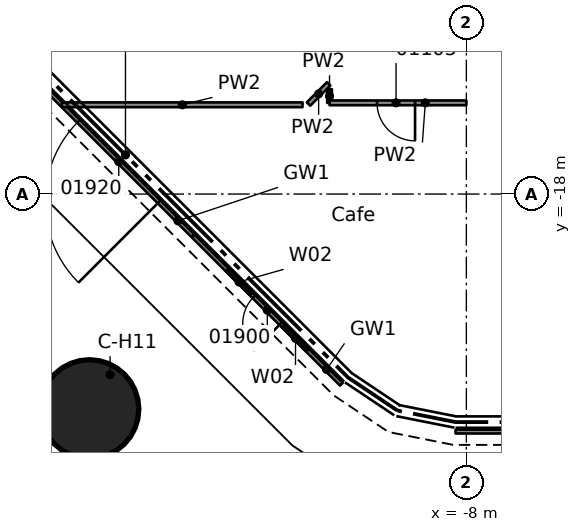
"""IFC4 building model, lengths in metres.
Left out: names, types, materials, properties, quantities, classifications, styles, units other than length and angle.
Written with IfcOpenShell. Run it as: python <this file> out.ifc"""

import sys

from ifc_helpers import new_model, si_unit, direction, frame, frame_2d, origin, origin_2d, place, context, subcontext, project, spatial, rectangle, circle, extrude, element, fill, save


model = new_model("IFC4")
c1 = context("Model", 3, precision=1e-05, world=origin(), true_north=direction((0.0, 1.0)))
c2 = subcontext(c1, "Body", "Model", "MODEL_VIEW")
j1 = project(units=[si_unit("LENGTHUNIT", "METRE"), si_unit("PLANEANGLEUNIT", "RADIAN")], contexts=[c1])
p1 = place(None, origin())
s1 = spatial("IfcSite", under=j1, at=p1, CompositionType="ELEMENT")
p2 = place(p1, origin())
s2 = spatial("IfcBuilding", under=s1, at=p2, CompositionType="ELEMENT")
p3 = place(p2, origin())
s3 = spatial("IfcBuildingStorey", under=s2, at=p3, CompositionType="ELEMENT", Elevation=0.0)
p4 = place(p3, frame((-17.919, -23.659, 0.6), z_axis=(0.0, 0.0, 1.0), x_axis=(1.0, 0.0, 0.0)))
e1 = element("IfcColumn", 1, at=p4, inside=s3, PredefinedType="COLUMN", context=c2, shape_type="SweptSolid", body=[
    extrude(circle(Radius=1.3, at=origin_2d()), origin(), (0.0, 0.0, 1.0), 8.9),
])
p5 = place(p3, frame((-11.289, -23.005, -0.4), z_axis=(0.0, 0.0, 1.0), x_axis=(-0.707106781187, 0.707106781187, 0.0)))
e2 = element("IfcWall", 2, at=p5, inside=s3, PredefinedType="STANDARD", context=c2, shape_type="SweptSolid", body=[
    extrude(rectangle(XDim=5.514, YDim=0.1, at=frame_2d((2.757, 0.0))), origin(), (0.0, 0.0, 1.0), 10.5),
])
p6 = place(p5, frame((2.257, 0.0, 0.4)))
e3 = element("IfcOpeningElement", 3, at=p6, cuts=e2, PredefinedType="OPENING", context=c2, shape_type="SweptSolid", body=[
    extrude(rectangle(XDim=1.0, YDim=2.4, at=frame_2d((0.5, 1.2))), frame((0.0, 0.06, 0.0), z_axis=(0.0, -1.0, 0.0), x_axis=(1.0, 0.0, 0.0)), (0.0, 0.0, 1.0), 0.12),
])
p7 = place(p5, frame((1.257, 0.0, 0.4)))
e4 = element("IfcOpeningElement", 4, at=p7, cuts=e2, PredefinedType="OPENING", context=c2, shape_type="SweptSolid", body=[
    extrude(rectangle(XDim=0.9, YDim=2.4, at=frame_2d((0.45, 1.2))), frame((0.0, 0.06, 0.0), z_axis=(0.0, -1.0, 0.0), x_axis=(1.0, 0.0, 0.0)), (0.0, 0.0, 1.0), 0.12),
])
p8 = place(p5, frame((3.357, 0.0, 0.4)))
e5 = element("IfcOpeningElement", 5, at=p8, cuts=e2, PredefinedType="OPENING", context=c2, shape_type="SweptSolid", body=[
    extrude(rectangle(XDim=0.9, YDim=2.4, at=frame_2d((0.45, 1.2))), frame((0.0, 0.06, 0.0), z_axis=(0.0, -1.0, 0.0), x_axis=(1.0, 0.0, 0.0)), (0.0, 0.0, 1.0), 0.12),
])
p9 = place(p3, frame((-15.201, -19.093, -0.4), z_axis=(0.0, 0.0, 1.0), x_axis=(-0.707106781187, 0.707106781187, 0.0)))
e6 = element("IfcWall", 6, at=p9, inside=s3, PredefinedType="STANDARD", context=c2, shape_type="SweptSolid", body=[
    extrude(rectangle(XDim=5.504, YDim=0.1, at=frame_2d((2.752, 0.0))), origin(), (0.0, 0.0, 1.0), 10.5),
])
p10 = place(p9, frame((1.252, 0.0, 0.4)))
e7 = element("IfcOpeningElement", 7, at=p10, cuts=e6, PredefinedType="OPENING", context=c2, shape_type="SweptSolid", body=[
    extrude(rectangle(XDim=3.0, YDim=4.5, at=frame_2d((1.5, 2.25))), frame((0.0, 0.06, 0.0), z_axis=(0.0, -1.0, 0.0), x_axis=(1.0, 0.0, 0.0)), (0.0, 0.0, 1.0), 0.12),
])
p11 = place(p3, frame((-2.771, -24.25, -0.4), z_axis=(0.0, 0.0, 1.0), x_axis=(-1.0, 0.0, 0.0)))
e8 = element("IfcWall", 8, at=p11, inside=s3, PredefinedType="STANDARD", context=c2, shape_type="SweptSolid", body=[
    extrude(rectangle(XDim=5.513, YDim=0.1, at=frame_2d((2.757, 0.0))), origin(), (0.0, 0.0, 1.0), 10.5),
])
p12 = place(p11, frame((2.257, 0.0, 0.4)))
e9 = element("IfcOpeningElement", 9, at=p12, cuts=e8, PredefinedType="OPENING", context=c2, shape_type="SweptSolid", body=[
    extrude(rectangle(XDim=1.0, YDim=2.4, at=frame_2d((0.5, 1.2))), frame((0.0, 0.06, 0.0), z_axis=(0.0, -1.0, 0.0), x_axis=(1.0, 0.0, 0.0)), (0.0, 0.0, 1.0), 0.12),
])
p13 = place(p11, frame((1.257, 0.0, 0.4)))
e10 = element("IfcOpeningElement", 10, at=p13, cuts=e8, PredefinedType="OPENING", context=c2, shape_type="SweptSolid", body=[
    extrude(rectangle(XDim=0.9, YDim=2.4, at=frame_2d((0.45, 1.2))), frame((0.0, 0.06, 0.0), z_axis=(0.0, -1.0, 0.0), x_axis=(1.0, 0.0, 0.0)), (0.0, 0.0, 1.0), 0.12),
])
p14 = place(p11, frame((3.357, 0.0, 0.4)))
e11 = element("IfcOpeningElement", 11, at=p14, cuts=e8, PredefinedType="OPENING", context=c2, shape_type="SweptSolid", body=[
    extrude(rectangle(XDim=0.9, YDim=2.4, at=frame_2d((0.45, 1.2))), frame((0.0, 0.06, 0.0), z_axis=(0.0, -1.0, 0.0), x_axis=(1.0, 0.0, 0.0)), (0.0, 0.0, 1.0), 0.12),
])
p15 = place(p3, frame((-11.601, -15.242, 0.0), z_axis=(0.0, 0.0, 1.0), x_axis=(0.002726642898, -0.999996282702, 0.0)))
e12 = element("IfcWall", 12, at=p15, inside=s3, PredefinedType="PARTITIONING", context=c2, shape_type="SweptSolid", body=[
    extrude(rectangle(XDim=0.358, YDim=0.125, at=frame_2d((0.179, 0.0))), origin(), (0.0, 0.0, 1.0), 10.1),
])
p16 = place(p3, frame((-18.642, -15.651, 0.0), z_axis=(0.0, 0.0, 1.0), x_axis=(1.0, 0.0, 0.0)))
e13 = element("IfcWall", 13, at=p16, inside=s3, PredefinedType="PARTITIONING", context=c2, shape_type="SweptSolid", body=[
    extrude(rectangle(XDim=6.331, YDim=0.125, at=frame_2d((3.166, 0.0))), origin(), (0.0, 0.0, 1.0), 10.1),
])
p17 = place(p3, frame((-8.0, -15.6, 0.0), z_axis=(0.0, 0.0, 1.0), x_axis=(-1.0, 0.0, 0.0)))
e14 = element("IfcWall", 14, at=p17, inside=s3, PredefinedType="PARTITIONING", context=c2, shape_type="SweptSolid", body=[
    extrude(rectangle(XDim=3.6, YDim=0.125, at=frame_2d((1.8, 0.0))), origin(), (0.0, 0.0, 1.0), 10.1),
])
p18 = place(p17, frame((1.35, 0.0, 0.0)))
e15 = element("IfcOpeningElement", 15, at=p18, cuts=e14, PredefinedType="OPENING", context=c2, shape_type="SweptSolid", body=[
    extrude(rectangle(XDim=1.0, YDim=2.1, at=frame_2d((0.5, 1.05))), frame((0.0, 0.073, 0.0), z_axis=(0.0, -1.0, 0.0), x_axis=(1.0, 0.0, 0.0)), (0.0, 0.0, 1.0), 0.145),
])
p19 = place(p3, frame((-12.153, -15.631, 0.0), z_axis=(0.0, 0.0, 1.0), x_axis=(0.707106781187, 0.707106781187, 0.0)))
e16 = element("IfcWall", 16, at=p19, inside=s3, PredefinedType="PARTITIONING", context=c2, shape_type="SweptSolid", body=[
    extrude(rectangle(XDim=0.751, YDim=0.125, at=frame_2d((0.375, 0.0))), origin(), (0.0, 0.0, 1.0), 10.1),
])
p20 = place(p6, origin())
e17 = element("IfcDoor", 17, at=p20, inside=s3, OperationType="SINGLE_SWING_RIGHT", PredefinedType="DOOR", context=c2, shape_type="SweptSolid", body=[
    extrude(rectangle(XDim=1.0, YDim=2.4, at=frame_2d((0.5, 1.2))), frame((0.0, 0.025, 0.0), z_axis=(0.0, -1.0, 0.0), x_axis=(1.0, 0.0, 0.0)), (0.0, 0.0, 1.0), 0.05),
])
fill(e3, e17)
p21 = place(p7, origin())
e18 = element("IfcWindow", 18, at=p21, inside=s3, PartitioningType="SINGLE_PANEL", PredefinedType="WINDOW", context=c2, shape_type="SweptSolid", body=[
    extrude(rectangle(XDim=0.9, YDim=2.4, at=frame_2d((0.45, 1.2))), frame((0.0, 0.03, 0.0), z_axis=(0.0, -1.0, 0.0), x_axis=(1.0, 0.0, 0.0)), (0.0, 0.0, 1.0), 0.06),
])
fill(e4, e18)
p22 = place(p8, origin())
e19 = element("IfcWindow", 19, at=p22, inside=s3, PartitioningType="SINGLE_PANEL", PredefinedType="WINDOW", context=c2, shape_type="SweptSolid", body=[
    extrude(rectangle(XDim=0.9, YDim=2.4, at=frame_2d((0.45, 1.2))), frame((0.0, 0.03, 0.0), z_axis=(0.0, -1.0, 0.0), x_axis=(1.0, 0.0, 0.0)), (0.0, 0.0, 1.0), 0.06),
])
fill(e5, e19)
p23 = place(p10, origin())
e20 = element("IfcDoor", 20, at=p23, inside=s3, OperationType="SINGLE_SWING_LEFT", PredefinedType="DOOR", context=c2, shape_type="SweptSolid", body=[
    extrude(rectangle(XDim=3.0, YDim=4.5, at=frame_2d((1.5, 2.25))), frame((0.0, 0.025, 0.0), z_axis=(0.0, -1.0, 0.0), x_axis=(1.0, 0.0, 0.0)), (0.0, 0.0, 1.0), 0.05),
])
fill(e7, e20)
p24 = place(p18, origin())
e21 = element("IfcDoor", 21, at=p24, inside=s3, OperationType="SINGLE_SWING_RIGHT", PredefinedType="DOOR", context=c2, shape_type="SweptSolid", body=[
    extrude(rectangle(XDim=1.0, YDim=2.1, at=frame_2d((0.5, 1.05))), frame((0.0, 0.025, 0.0), z_axis=(0.0, -1.0, 0.0), x_axis=(1.0, 0.0, 0.0)), (0.0, 0.0, 1.0), 0.05),
])
fill(e15, e21)
save(model, sys.argv[1])
